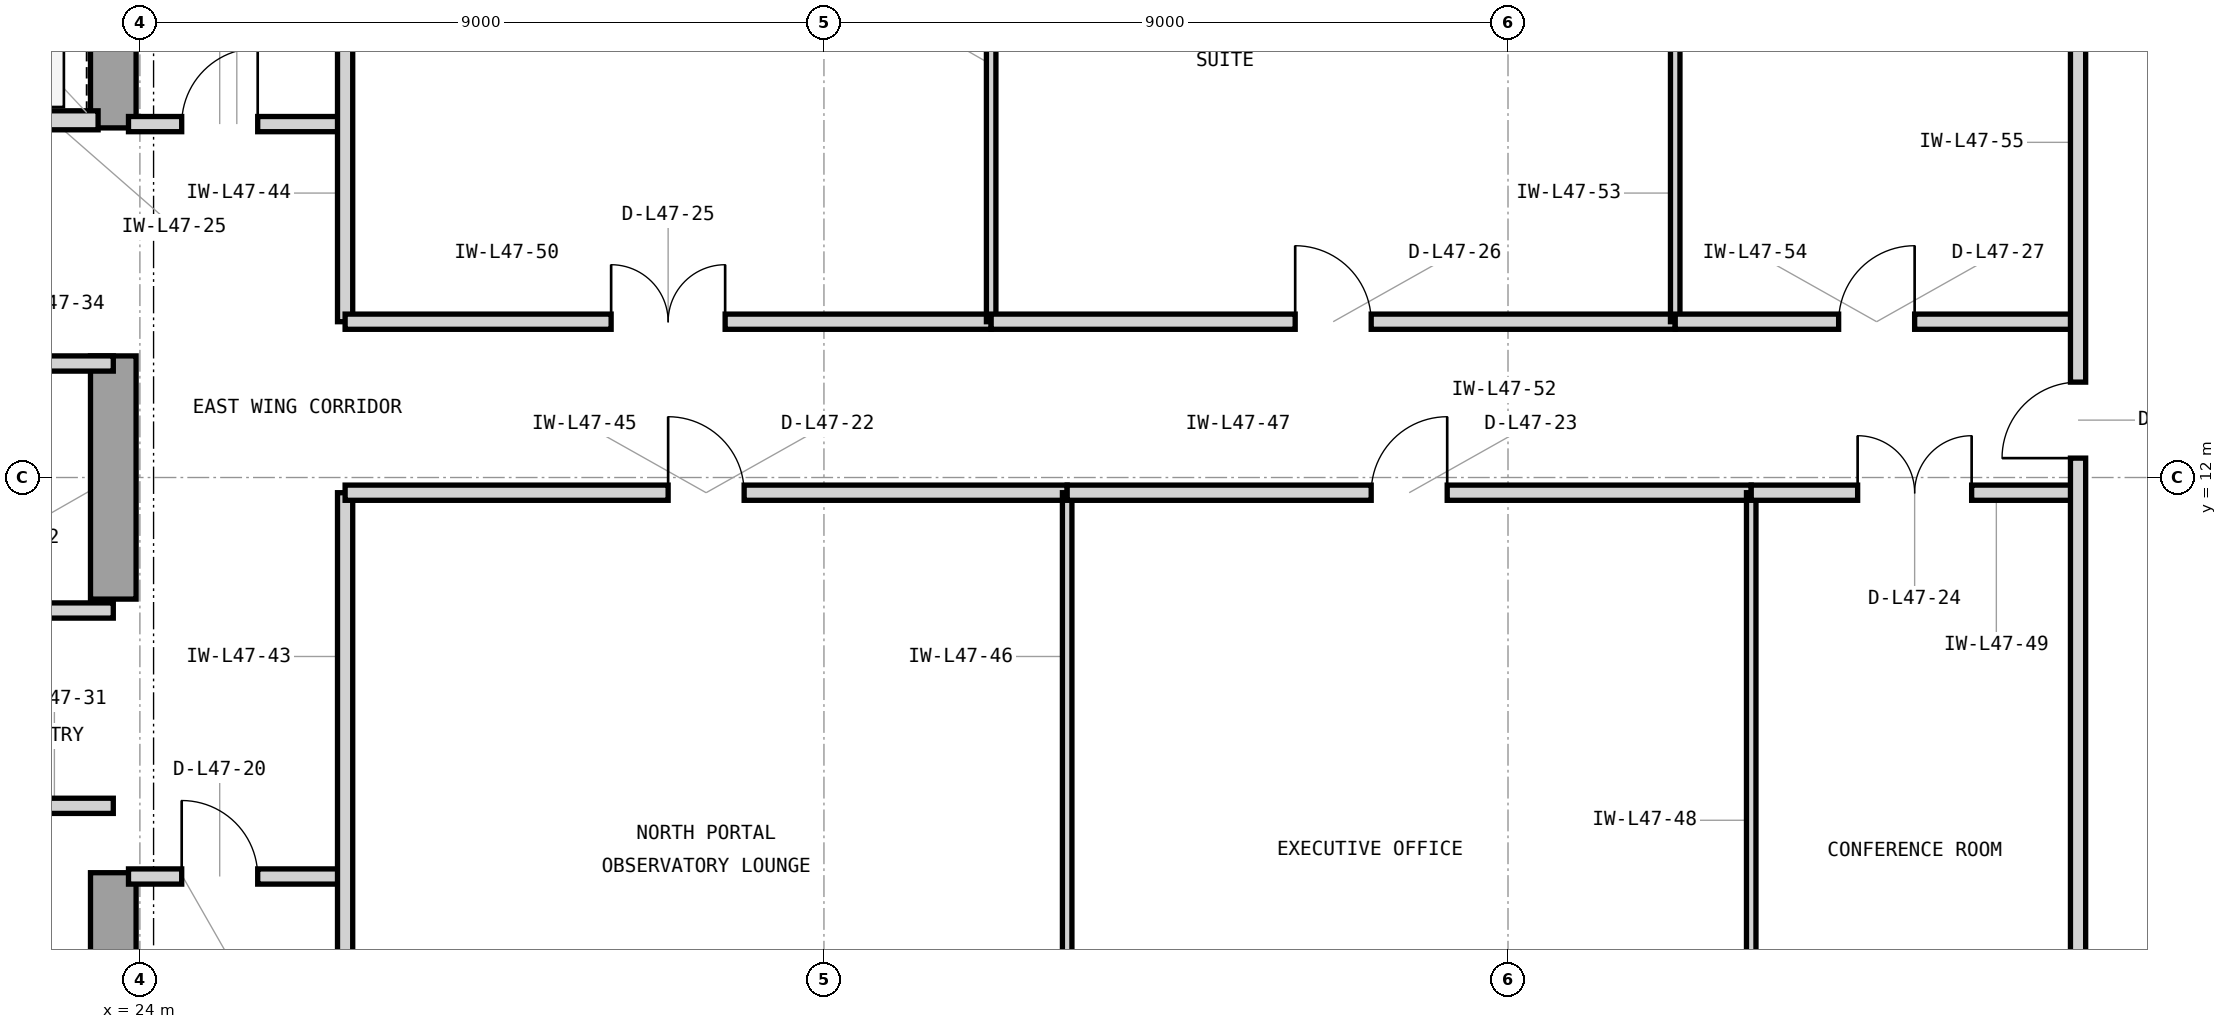
"""IFC4 building model, lengths in metres.
Left out: names, types, materials, properties, quantities, classifications, styles, units other than length and angle.
Written with IfcOpenShell. Run it as: python <this file> out.ifc"""

import sys

from ifc_helpers import new_model, si_unit, direction, frame, frame_2d, origin, place, context, subcontext, project, spatial, rectangle, extrude, element, fill, save


model = new_model("IFC4")
c1 = context("Model", 3, precision=1e-05, world=origin(), true_north=direction((0.0, 1.0)))
c2 = subcontext(c1, "Body", "Model", "MODEL_VIEW")
j1 = project(units=[si_unit("LENGTHUNIT", "METRE"), si_unit("PLANEANGLEUNIT", "RADIAN")], contexts=[c1])
p1 = place(None, origin())
s1 = spatial("IfcSite", under=j1, at=p1, CompositionType="ELEMENT")
p2 = place(p1, origin())
s2 = spatial("IfcBuilding", under=s1, at=p2, CompositionType="ELEMENT")
p3 = place(p2, frame((0.0, 0.0, 195.6)))
s3 = spatial("IfcBuildingStorey", under=s2, at=p3, CompositionType="ELEMENT", Elevation=195.6)
p4 = place(p3, frame((23.65, 3.65, 0.0), z_axis=(0.0, 0.0, 1.0), x_axis=(0.0, 1.0, 0.0)))
e1 = element("IfcWall", 1, at=p4, inside=s3, PredefinedType="SHEAR", context=c2, shape_type="SweptSolid", body=[
    extrude(rectangle(XDim=3.15, YDim=0.6, at=frame_2d((1.575, 0.0))), origin(), (0.0, 0.0, 1.0), 3.9),
])
p5 = place(p3, frame((23.65, 10.4, 0.0), z_axis=(0.0, 0.0, 1.0), x_axis=(0.0, 1.0, 0.0)))
e2 = element("IfcWall", 2, at=p5, inside=s3, PredefinedType="SHEAR", context=c2, shape_type="SweptSolid", body=[
    extrude(rectangle(XDim=3.2, YDim=0.6, at=frame_2d((1.6, 0.0))), origin(), (0.0, 0.0, 1.0), 3.9),
])
p6 = place(p3, frame((23.65, 16.6, 0.0), z_axis=(0.0, 0.0, 1.0), x_axis=(0.0, 1.0, 0.0)))
e3 = element("IfcWall", 3, at=p6, inside=s3, PredefinedType="SHEAR", context=c2, shape_type="SweptSolid", body=[
    extrude(rectangle(XDim=4.05, YDim=0.6, at=frame_2d((2.025, 0.0))), origin(), (0.0, 0.0, 1.0), 3.9),
])
p7 = place(p3, frame((21.05, 16.7, 0.0), z_axis=(0.0, 0.0, 1.0), x_axis=(1.0, 0.0, 0.0)))
e4 = element("IfcWall", 4, at=p7, inside=s3, PredefinedType="PARTITIONING", context=c2, shape_type="SweptSolid", body=[
    extrude(rectangle(XDim=2.4, YDim=0.25, at=frame_2d((1.2, 0.0))), origin(), (0.0, 0.0, 1.0), 3.283),
])
p8 = place(p7, frame((0.52, 0.0, 0.0)))
e5 = element("IfcOpeningElement", 5, at=p8, cuts=e4, PredefinedType="OPENING", context=c2, shape_type="SweptSolid", body=[
    extrude(rectangle(XDim=1.15, YDim=2.25, at=frame_2d((0.575, 1.125))), frame((0.0, 0.135, 0.0), z_axis=(0.0, -1.0, 0.0), x_axis=(1.0, 0.0, 0.0)), (0.0, 0.0, 1.0), 0.27),
])
p9 = place(p3, frame((20.55, 7.68, 0.0), z_axis=(0.0, 0.0, 1.0), x_axis=(1.0, 0.0, 0.0)))
e6 = element("IfcWall", 6, at=p9, inside=s3, PredefinedType="PARTITIONING", context=c2, shape_type="SweptSolid", body=[
    extrude(rectangle(XDim=3.1, YDim=0.2, at=frame_2d((1.55, 0.0))), origin(), (0.0, 0.0, 1.0), 3.69),
])
p10 = place(p9, frame((1.075, 0.0, 0.0)))
e7 = element("IfcOpeningElement", 7, at=p10, cuts=e6, PredefinedType="OPENING", context=c2, shape_type="SweptSolid", body=[
    extrude(rectangle(XDim=0.95, YDim=2.1, at=frame_2d((0.475, 1.05))), frame((0.0, 0.11, 0.0), z_axis=(0.0, -1.0, 0.0), x_axis=(1.0, 0.0, 0.0)), (0.0, 0.0, 1.0), 0.22),
])
p11 = place(p3, frame((14.825, 10.25, 0.0), z_axis=(0.0, 0.0, 1.0), x_axis=(1.0, 0.0, 0.0)))
e8 = element("IfcWall", 8, at=p11, inside=s3, PredefinedType="PARTITIONING", context=c2, shape_type="SweptSolid", body=[
    extrude(rectangle(XDim=8.825, YDim=0.2, at=frame_2d((4.413, 0.0))), origin(), (0.0, 0.0, 1.0), 3.69),
])
p12 = place(p3, frame((18.45, 13.5, 0.0), z_axis=(0.0, 0.0, 1.0), x_axis=(1.0, 0.0, 0.0)))
e9 = element("IfcWall", 9, at=p12, inside=s3, PredefinedType="PARTITIONING", context=c2, shape_type="SweptSolid", body=[
    extrude(rectangle(XDim=5.2, YDim=0.2, at=frame_2d((2.6, 0.0))), origin(), (0.0, 0.0, 1.0), 3.283),
])
p13 = place(p12, frame((2.125, 0.0, 0.0)))
e10 = element("IfcOpeningElement", 10, at=p13, cuts=e9, PredefinedType="OPENING", context=c2, shape_type="SweptSolid", body=[
    extrude(rectangle(XDim=0.95, YDim=2.1, at=frame_2d((0.475, 1.05))), frame((0.0, 0.11, 0.0), z_axis=(0.0, -1.0, 0.0), x_axis=(1.0, 0.0, 0.0)), (0.0, 0.0, 1.0), 0.22),
])
p14 = place(p3, frame((23.85, 6.75, 0.0), z_axis=(0.0, 0.0, 1.0), x_axis=(1.0, 0.0, 0.0)))
e11 = element("IfcWall", 11, at=p14, inside=s3, PredefinedType="PARTITIONING", context=c2, shape_type="SweptSolid", body=[
    extrude(rectangle(XDim=2.85, YDim=0.2, at=frame_2d((1.425, 0.0))), origin(), (0.0, 0.0, 1.0), 3.69),
])
p15 = place(p14, frame((0.7, 0.0, 0.0)))
e12 = element("IfcOpeningElement", 12, at=p15, cuts=e11, PredefinedType="OPENING", context=c2, shape_type="SweptSolid", body=[
    extrude(rectangle(XDim=1.0, YDim=2.15, at=frame_2d((0.5, 1.075))), frame((0.0, 0.11, 0.0), z_axis=(0.0, -1.0, 0.0), x_axis=(1.0, 0.0, 0.0)), (0.0, 0.0, 1.0), 0.22),
])
p16 = place(p3, frame((23.85, 16.65, 0.0), z_axis=(0.0, 0.0, 1.0), x_axis=(1.0, 0.0, 0.0)))
e13 = element("IfcWall", 13, at=p16, inside=s3, PredefinedType="PARTITIONING", context=c2, shape_type="SweptSolid", body=[
    extrude(rectangle(XDim=2.85, YDim=0.2, at=frame_2d((1.425, 0.0))), origin(), (0.0, 0.0, 1.0), 3.69),
])
p17 = place(p16, frame((0.7, 0.0, 0.0)))
e14 = element("IfcOpeningElement", 14, at=p17, cuts=e13, PredefinedType="OPENING", context=c2, shape_type="SweptSolid", body=[
    extrude(rectangle(XDim=1.0, YDim=2.15, at=frame_2d((0.5, 1.075))), frame((0.0, 0.11, 0.0), z_axis=(0.0, -1.0, 0.0), x_axis=(1.0, 0.0, 0.0)), (0.0, 0.0, 1.0), 0.22),
])
p18 = place(p3, frame((26.7, 3.18, 0.0), z_axis=(0.0, 0.0, 1.0), x_axis=(0.0, 1.0, 0.0)))
e15 = element("IfcWall", 15, at=p18, inside=s3, PredefinedType="PARTITIONING", context=c2, shape_type="SweptSolid", body=[
    extrude(rectangle(XDim=8.62, YDim=0.2, at=frame_2d((4.31, 0.0))), origin(), (0.0, 0.0, 1.0), 3.69),
])
p19 = place(p3, frame((26.7, 14.05, 0.0), z_axis=(0.0, 0.0, 1.0), x_axis=(0.0, 1.0, 0.0)))
e16 = element("IfcWall", 16, at=p19, inside=s3, PredefinedType="PARTITIONING", context=c2, shape_type="SweptSolid", body=[
    extrude(rectangle(XDim=6.77, YDim=0.2, at=frame_2d((3.385, 0.0))), origin(), (0.0, 0.0, 1.0), 3.69),
])
p20 = place(p3, frame((26.7, 11.8, 0.0), z_axis=(0.0, 0.0, 1.0), x_axis=(1.0, 0.0, 0.0)))
e17 = element("IfcWall", 17, at=p20, inside=s3, PredefinedType="PARTITIONING", context=c2, shape_type="SweptSolid", body=[
    extrude(rectangle(XDim=9.5, YDim=0.2, at=frame_2d((4.75, 0.0))), origin(), (0.0, 0.0, 1.0), 3.69),
])
p21 = place(p20, frame((4.25, 0.0, 0.0)))
e18 = element("IfcOpeningElement", 18, at=p21, cuts=e17, PredefinedType="OPENING", context=c2, shape_type="SweptSolid", body=[
    extrude(rectangle(XDim=1.0, YDim=2.15, at=frame_2d((0.5, 1.075))), frame((0.0, 0.11, 0.0), z_axis=(0.0, -1.0, 0.0), x_axis=(1.0, 0.0, 0.0)), (0.0, 0.0, 1.0), 0.22),
])
p22 = place(p3, frame((36.2, 3.18, 0.0), z_axis=(0.0, 0.0, 1.0), x_axis=(0.0, 1.0, 0.0)))
e19 = element("IfcWall", 19, at=p22, inside=s3, PredefinedType="PARTITIONING", context=c2, shape_type="SweptSolid", body=[
    extrude(rectangle(XDim=8.62, YDim=0.125, at=frame_2d((4.31, 0.0))), origin(), (0.0, 0.0, 1.0), 3.69),
])
p23 = place(p3, frame((36.2, 11.8, 0.0), z_axis=(0.0, 0.0, 1.0), x_axis=(1.0, 0.0, 0.0)))
e20 = element("IfcWall", 20, at=p23, inside=s3, PredefinedType="PARTITIONING", context=c2, shape_type="SweptSolid", body=[
    extrude(rectangle(XDim=9.0, YDim=0.2, at=frame_2d((4.5, 0.0))), origin(), (0.0, 0.0, 1.0), 3.69),
])
p24 = place(p23, frame((4.0, 0.0, 0.0)))
e21 = element("IfcOpeningElement", 21, at=p24, cuts=e20, PredefinedType="OPENING", context=c2, shape_type="SweptSolid", body=[
    extrude(rectangle(XDim=1.0, YDim=2.15, at=frame_2d((0.5, 1.075))), frame((0.0, 0.11, 0.0), z_axis=(0.0, -1.0, 0.0), x_axis=(1.0, 0.0, 0.0)), (0.0, 0.0, 1.0), 0.22),
])
p25 = place(p3, frame((45.2, 3.18, 0.0), z_axis=(0.0, 0.0, 1.0), x_axis=(0.0, 1.0, 0.0)))
e22 = element("IfcWall", 22, at=p25, inside=s3, PredefinedType="PARTITIONING", context=c2, shape_type="SweptSolid", body=[
    extrude(rectangle(XDim=8.62, YDim=0.125, at=frame_2d((4.31, 0.0))), origin(), (0.0, 0.0, 1.0), 3.69),
])
p26 = place(p3, frame((45.2, 11.8, 0.0), z_axis=(0.0, 0.0, 1.0), x_axis=(1.0, 0.0, 0.0)))
e23 = element("IfcWall", 23, at=p26, inside=s3, PredefinedType="PARTITIONING", context=c2, shape_type="SweptSolid", body=[
    extrude(rectangle(XDim=4.3, YDim=0.2, at=frame_2d((2.15, 0.0))), origin(), (0.0, 0.0, 1.0), 3.69),
])
p27 = place(p26, frame((1.4, 0.0, 0.0)))
e24 = element("IfcOpeningElement", 24, at=p27, cuts=e23, PredefinedType="OPENING", context=c2, shape_type="SweptSolid", body=[
    extrude(rectangle(XDim=1.5, YDim=2.3, at=frame_2d((0.75, 1.15))), frame((0.0, 0.11, 0.0), z_axis=(0.0, -1.0, 0.0), x_axis=(1.0, 0.0, 0.0)), (0.0, 0.0, 1.0), 0.22),
])
p28 = place(p3, frame((26.7, 14.05, 0.0), z_axis=(0.0, 0.0, 1.0), x_axis=(1.0, 0.0, 0.0)))
e25 = element("IfcWall", 25, at=p28, inside=s3, PredefinedType="PARTITIONING", context=c2, shape_type="SweptSolid", body=[
    extrude(rectangle(XDim=8.5, YDim=0.2, at=frame_2d((4.25, 0.0))), origin(), (0.0, 0.0, 1.0), 3.69),
])
p29 = place(p28, frame((3.5, 0.0, 0.0)))
e26 = element("IfcOpeningElement", 26, at=p29, cuts=e25, PredefinedType="OPENING", context=c2, shape_type="SweptSolid", body=[
    extrude(rectangle(XDim=1.5, YDim=2.3, at=frame_2d((0.75, 1.15))), frame((0.0, 0.11, 0.0), z_axis=(0.0, -1.0, 0.0), x_axis=(1.0, 0.0, 0.0)), (0.0, 0.0, 1.0), 0.22),
])
p30 = place(p3, frame((35.2, 14.05, 0.0), z_axis=(0.0, 0.0, 1.0), x_axis=(0.0, 1.0, 0.0)))
e27 = element("IfcWall", 27, at=p30, inside=s3, PredefinedType="PARTITIONING", context=c2, shape_type="SweptSolid", body=[
    extrude(rectangle(XDim=6.77, YDim=0.125, at=frame_2d((3.385, 0.0))), origin(), (0.0, 0.0, 1.0), 3.69),
])
p31 = place(p3, frame((35.2, 14.05, 0.0), z_axis=(0.0, 0.0, 1.0), x_axis=(1.0, 0.0, 0.0)))
e28 = element("IfcWall", 28, at=p31, inside=s3, PredefinedType="PARTITIONING", context=c2, shape_type="SweptSolid", body=[
    extrude(rectangle(XDim=9.0, YDim=0.2, at=frame_2d((4.5, 0.0))), origin(), (0.0, 0.0, 1.0), 3.69),
])
p32 = place(p31, frame((4.0, 0.0, 0.0)))
e29 = element("IfcOpeningElement", 29, at=p32, cuts=e28, PredefinedType="OPENING", context=c2, shape_type="SweptSolid", body=[
    extrude(rectangle(XDim=1.0, YDim=2.15, at=frame_2d((0.5, 1.075))), frame((0.0, 0.11, 0.0), z_axis=(0.0, -1.0, 0.0), x_axis=(1.0, 0.0, 0.0)), (0.0, 0.0, 1.0), 0.22),
])
p33 = place(p3, frame((44.2, 14.05, 0.0), z_axis=(0.0, 0.0, 1.0), x_axis=(0.0, 1.0, 0.0)))
e30 = element("IfcWall", 30, at=p33, inside=s3, PredefinedType="PARTITIONING", context=c2, shape_type="SweptSolid", body=[
    extrude(rectangle(XDim=6.77, YDim=0.125, at=frame_2d((3.385, 0.0))), origin(), (0.0, 0.0, 1.0), 3.69),
])
p34 = place(p3, frame((44.2, 14.05, 0.0), z_axis=(0.0, 0.0, 1.0), x_axis=(1.0, 0.0, 0.0)))
e31 = element("IfcWall", 31, at=p34, inside=s3, PredefinedType="PARTITIONING", context=c2, shape_type="SweptSolid", body=[
    extrude(rectangle(XDim=5.3, YDim=0.2, at=frame_2d((2.65, 0.0))), origin(), (0.0, 0.0, 1.0), 3.69),
])
p35 = place(p34, frame((2.15, 0.0, 0.0)))
e32 = element("IfcOpeningElement", 32, at=p35, cuts=e31, PredefinedType="OPENING", context=c2, shape_type="SweptSolid", body=[
    extrude(rectangle(XDim=1.0, YDim=2.15, at=frame_2d((0.5, 1.075))), frame((0.0, 0.11, 0.0), z_axis=(0.0, -1.0, 0.0), x_axis=(1.0, 0.0, 0.0)), (0.0, 0.0, 1.0), 0.22),
])
p36 = place(p3, frame((49.5, 3.18, 0.0), z_axis=(0.0, 0.0, 1.0), x_axis=(0.0, 1.0, 0.0)))
e33 = element("IfcWall", 33, at=p36, inside=s3, PredefinedType="PARTITIONING", context=c2, shape_type="SweptSolid", body=[
    extrude(rectangle(XDim=17.64, YDim=0.2, at=frame_2d((8.82, 0.0))), origin(), (0.0, 0.0, 1.0), 3.69),
])
p37 = place(p36, frame((9.075, 0.0, 0.0)))
e34 = element("IfcOpeningElement", 34, at=p37, cuts=e33, PredefinedType="OPENING", context=c2, shape_type="SweptSolid", body=[
    extrude(rectangle(XDim=1.0, YDim=2.15, at=frame_2d((0.5, 1.075))), frame((0.0, 0.11, 0.0), z_axis=(0.0, -1.0, 0.0), x_axis=(1.0, 0.0, 0.0)), (0.0, 0.0, 1.0), 0.22),
])
p38 = place(p15, origin())
e35 = element("IfcDoor", 35, at=p38, inside=s3, OperationType="SINGLE_SWING_LEFT", PredefinedType="DOOR", context=c2, shape_type="SweptSolid", body=[
    extrude(rectangle(XDim=1.0, YDim=2.15, at=frame_2d((0.5, 1.075))), frame((0.0, 0.025, 0.0), z_axis=(0.0, -1.0, 0.0), x_axis=(1.0, 0.0, 0.0)), (0.0, 0.0, 1.0), 0.05),
])
fill(e12, e35)
p39 = place(p17, origin())
e36 = element("IfcDoor", 36, at=p39, inside=s3, OperationType="SINGLE_SWING_RIGHT", PredefinedType="DOOR", context=c2, shape_type="SweptSolid", body=[
    extrude(rectangle(XDim=1.0, YDim=2.15, at=frame_2d((0.5, 1.075))), frame((0.0, 0.025, 0.0), z_axis=(0.0, -1.0, 0.0), x_axis=(1.0, 0.0, 0.0)), (0.0, 0.0, 1.0), 0.05),
])
fill(e14, e36)
p40 = place(p21, origin())
e37 = element("IfcDoor", 37, at=p40, inside=s3, OperationType="SINGLE_SWING_LEFT", PredefinedType="DOOR", context=c2, shape_type="SweptSolid", body=[
    extrude(rectangle(XDim=1.0, YDim=2.15, at=frame_2d((0.5, 1.075))), frame((0.0, 0.025, 0.0), z_axis=(0.0, -1.0, 0.0), x_axis=(1.0, 0.0, 0.0)), (0.0, 0.0, 1.0), 0.05),
])
fill(e18, e37)
p41 = place(p24, origin())
e38 = element("IfcDoor", 38, at=p41, inside=s3, OperationType="SINGLE_SWING_RIGHT", PredefinedType="DOOR", context=c2, shape_type="SweptSolid", body=[
    extrude(rectangle(XDim=1.0, YDim=2.15, at=frame_2d((0.5, 1.075))), frame((0.0, 0.025, 0.0), z_axis=(0.0, -1.0, 0.0), x_axis=(1.0, 0.0, 0.0)), (0.0, 0.0, 1.0), 0.05),
])
fill(e21, e38)
p42 = place(p27, origin())
e39 = element("IfcDoor", 39, at=p42, inside=s3, OperationType="DOUBLE_DOOR_SINGLE_SWING", PredefinedType="DOOR", context=c2, shape_type="SweptSolid", body=[
    extrude(rectangle(XDim=1.5, YDim=2.3, at=frame_2d((0.75, 1.15))), frame((0.0, 0.025, 0.0), z_axis=(0.0, -1.0, 0.0), x_axis=(1.0, 0.0, 0.0)), (0.0, 0.0, 1.0), 0.05),
])
fill(e24, e39)
p43 = place(p29, origin())
e40 = element("IfcDoor", 40, at=p43, inside=s3, OperationType="DOUBLE_DOOR_SINGLE_SWING", PredefinedType="DOOR", context=c2, shape_type="SweptSolid", body=[
    extrude(rectangle(XDim=1.5, YDim=2.3, at=frame_2d((0.75, 1.15))), frame((0.0, 0.025, 0.0), z_axis=(0.0, -1.0, 0.0), x_axis=(1.0, 0.0, 0.0)), (0.0, 0.0, 1.0), 0.05),
])
fill(e26, e40)
p44 = place(p32, origin())
e41 = element("IfcDoor", 41, at=p44, inside=s3, OperationType="SINGLE_SWING_LEFT", PredefinedType="DOOR", context=c2, shape_type="SweptSolid", body=[
    extrude(rectangle(XDim=1.0, YDim=2.15, at=frame_2d((0.5, 1.075))), frame((0.0, 0.025, 0.0), z_axis=(0.0, -1.0, 0.0), x_axis=(1.0, 0.0, 0.0)), (0.0, 0.0, 1.0), 0.05),
])
fill(e29, e41)
p45 = place(p35, origin())
e42 = element("IfcDoor", 42, at=p45, inside=s3, OperationType="SINGLE_SWING_RIGHT", PredefinedType="DOOR", context=c2, shape_type="SweptSolid", body=[
    extrude(rectangle(XDim=1.0, YDim=2.15, at=frame_2d((0.5, 1.075))), frame((0.0, 0.025, 0.0), z_axis=(0.0, -1.0, 0.0), x_axis=(1.0, 0.0, 0.0)), (0.0, 0.0, 1.0), 0.05),
])
fill(e32, e42)
p46 = place(p37, origin())
e43 = element("IfcDoor", 43, at=p46, inside=s3, OperationType="SINGLE_SWING_LEFT", PredefinedType="DOOR", context=c2, shape_type="SweptSolid", body=[
    extrude(rectangle(XDim=1.0, YDim=2.15, at=frame_2d((0.5, 1.075))), frame((0.0, 0.025, 0.0), z_axis=(0.0, -1.0, 0.0), x_axis=(1.0, 0.0, 0.0)), (0.0, 0.0, 1.0), 0.05),
])
fill(e34, e43)
save(model, sys.argv[1])
